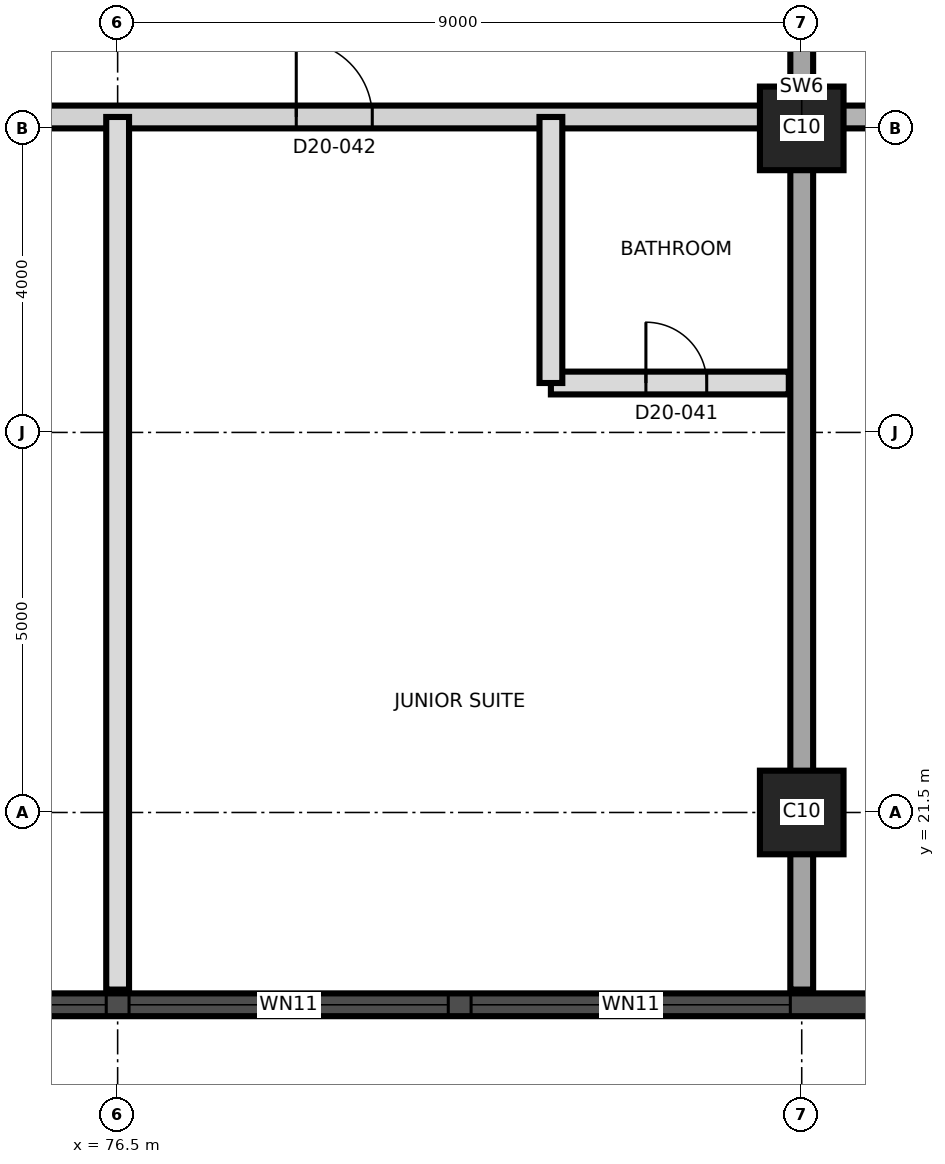
"""IFC4 building model, lengths in metres.
Left out: names, types, materials, properties, quantities, classifications, styles, units other than length and angle.
Written with IfcOpenShell. Run it as: python <this file> out.ifc"""

import sys

from ifc_helpers import new_model, si_unit, direction, frame, frame_2d, origin, origin_2d, place, context, subcontext, project, spatial, rectangle, extrude, element, fill, save


model = new_model("IFC4")
c1 = context("Model", 3, precision=1e-05, world=origin(), true_north=direction((0.0, 1.0)))
c2 = subcontext(c1, "Body", "Model", "MODEL_VIEW")
j1 = project(units=[si_unit("LENGTHUNIT", "METRE"), si_unit("PLANEANGLEUNIT", "RADIAN")], contexts=[c1])
p1 = place(None, origin())
s1 = spatial("IfcSite", under=j1, at=p1, CompositionType="ELEMENT")
p2 = place(p1, origin())
s2 = spatial("IfcBuilding", under=s1, at=p2, CompositionType="ELEMENT")
p3 = place(p2, frame((0.0, 0.0, 186.6)))
s3 = spatial("IfcBuildingStorey", under=s2, at=p3, CompositionType="ELEMENT", Elevation=186.6)
for number, where, z_axis, x_axis in (
    (1, (85.5, 21.5, 0.0), (0.0, 0.0, 1.0), (1.0, 0.0, 0.0)),
    (2, (85.5, 30.5, 0.0), (0.0, 0.0, 1.0), (1.0, 0.0, 0.0)),
):
    element("IfcColumn", number, at=place(p3, frame(where, z_axis=z_axis, x_axis=x_axis)), inside=s3, PredefinedType="COLUMN", context=c2, shape_type="SweptSolid", body=[
        extrude(rectangle(XDim=1.1, YDim=1.1, at=origin_2d()), origin(), (0.0, 0.0, 1.0), 3.7),
    ])
p4 = place(p3, frame((85.5, 19.17, 0.0), z_axis=(0.0, 0.0, 1.0), x_axis=(0.0, 1.0, 0.0)))
e3 = element("IfcWall", 3, at=p4, inside=s3, PredefinedType="SHEAR", context=c2, shape_type="SweptSolid", body=[
    extrude(rectangle(XDim=22.66, YDim=0.3, at=frame_2d((11.33, 0.0))), origin(), (0.0, 0.0, 1.0), 3.7),
])
p5 = place(p4, frame((12.53, 0.0, 0.0)))
e4 = element("IfcOpeningElement", 4, at=p5, cuts=e3, PredefinedType="OPENING", context=c2, shape_type="SweptSolid", body=[
    extrude(rectangle(XDim=1.4, YDim=2.1, at=frame_2d((0.7, 1.05))), frame((0.0, 0.16, 0.0), z_axis=(0.0, -1.0, 0.0), x_axis=(1.0, 0.0, 0.0)), (0.0, 0.0, 1.0), 0.32),
])
p6 = place(p3, frame((44.01, 18.97, 0.0), z_axis=(0.0, 0.0, 1.0), x_axis=(1.0, 0.0, 0.0)))
e5 = element("IfcWall", 5, at=p6, inside=s3, PredefinedType="SOLIDWALL", context=c2, shape_type="SweptSolid", body=[
    extrude(rectangle(XDim=43.478, YDim=0.3, at=frame_2d((21.739, 0.0))), origin(), (0.0, 0.0, 1.0), 3.4),
])
p7 = place(p6, frame((1.845, 0.0, 0.3)))
e6 = element("IfcOpeningElement", 6, at=p7, cuts=e5, PredefinedType="OPENING", context=c2, shape_type="SweptSolid", body=[
    extrude(rectangle(XDim=1.8, YDim=2.4, at=frame_2d((0.9, 1.2))), frame((0.0, 0.16, 0.0), z_axis=(0.0, -1.0, 0.0), x_axis=(1.0, 0.0, 0.0)), (0.0, 0.0, 1.0), 0.32),
])
p8 = place(p6, frame((5.64, 0.0, 0.9)))
e7 = element("IfcOpeningElement", 7, at=p8, cuts=e5, PredefinedType="OPENING", context=c2, shape_type="SweptSolid", body=[
    extrude(rectangle(XDim=4.2, YDim=1.5, at=frame_2d((2.1, 0.75))), frame((0.0, 0.16, 0.0), z_axis=(0.0, -1.0, 0.0), x_axis=(1.0, 0.0, 0.0)), (0.0, 0.0, 1.0), 0.32),
])
p9 = place(p6, frame((10.14, 0.0, 0.9)))
e8 = element("IfcOpeningElement", 8, at=p9, cuts=e5, PredefinedType="OPENING", context=c2, shape_type="SweptSolid", body=[
    extrude(rectangle(XDim=4.2, YDim=1.5, at=frame_2d((2.1, 0.75))), frame((0.0, 0.16, 0.0), z_axis=(0.0, -1.0, 0.0), x_axis=(1.0, 0.0, 0.0)), (0.0, 0.0, 1.0), 0.32),
])
p10 = place(p6, frame((14.64, 0.0, 0.9)))
e9 = element("IfcOpeningElement", 9, at=p10, cuts=e5, PredefinedType="OPENING", context=c2, shape_type="SweptSolid", body=[
    extrude(rectangle(XDim=4.2, YDim=1.5, at=frame_2d((2.1, 0.75))), frame((0.0, 0.16, 0.0), z_axis=(0.0, -1.0, 0.0), x_axis=(1.0, 0.0, 0.0)), (0.0, 0.0, 1.0), 0.32),
])
p11 = place(p6, frame((19.14, 0.0, 0.9)))
e10 = element("IfcOpeningElement", 10, at=p11, cuts=e5, PredefinedType="OPENING", context=c2, shape_type="SweptSolid", body=[
    extrude(rectangle(XDim=4.2, YDim=1.5, at=frame_2d((2.1, 0.75))), frame((0.0, 0.16, 0.0), z_axis=(0.0, -1.0, 0.0), x_axis=(1.0, 0.0, 0.0)), (0.0, 0.0, 1.0), 0.32),
])
p12 = place(p6, frame((23.64, 0.0, 0.9)))
e11 = element("IfcOpeningElement", 11, at=p12, cuts=e5, PredefinedType="OPENING", context=c2, shape_type="SweptSolid", body=[
    extrude(rectangle(XDim=4.2, YDim=1.5, at=frame_2d((2.1, 0.75))), frame((0.0, 0.16, 0.0), z_axis=(0.0, -1.0, 0.0), x_axis=(1.0, 0.0, 0.0)), (0.0, 0.0, 1.0), 0.32),
])
p13 = place(p6, frame((28.14, 0.0, 0.9)))
e12 = element("IfcOpeningElement", 12, at=p13, cuts=e5, PredefinedType="OPENING", context=c2, shape_type="SweptSolid", body=[
    extrude(rectangle(XDim=4.2, YDim=1.5, at=frame_2d((2.1, 0.75))), frame((0.0, 0.16, 0.0), z_axis=(0.0, -1.0, 0.0), x_axis=(1.0, 0.0, 0.0)), (0.0, 0.0, 1.0), 0.32),
])
p14 = place(p6, frame((32.64, 0.0, 0.9)))
e13 = element("IfcOpeningElement", 13, at=p14, cuts=e5, PredefinedType="OPENING", context=c2, shape_type="SweptSolid", body=[
    extrude(rectangle(XDim=4.2, YDim=1.5, at=frame_2d((2.1, 0.75))), frame((0.0, 0.16, 0.0), z_axis=(0.0, -1.0, 0.0), x_axis=(1.0, 0.0, 0.0)), (0.0, 0.0, 1.0), 0.32),
])
p15 = place(p6, frame((37.14, 0.0, 0.9)))
e14 = element("IfcOpeningElement", 14, at=p15, cuts=e5, PredefinedType="OPENING", context=c2, shape_type="SweptSolid", body=[
    extrude(rectangle(XDim=4.2, YDim=1.5, at=frame_2d((2.1, 0.75))), frame((0.0, 0.16, 0.0), z_axis=(0.0, -1.0, 0.0), x_axis=(1.0, 0.0, 0.0)), (0.0, 0.0, 1.0), 0.32),
])
p16 = place(p3, frame((82.2, 27.15, 0.0), z_axis=(0.0, 0.0, 1.0), x_axis=(1.0, 0.0, 0.0)))
e15 = element("IfcWall", 15, at=p16, inside=s3, PredefinedType="PARTITIONING", context=c2, shape_type="SweptSolid", body=[
    extrude(rectangle(XDim=3.13, YDim=0.3, at=frame_2d((1.565, 0.0))), origin(), (0.0, 0.0, 1.0), 3.4),
])
p17 = place(p16, frame((1.25, 0.0, 0.0)))
e16 = element("IfcOpeningElement", 16, at=p17, cuts=e15, PredefinedType="OPENING", context=c2, shape_type="SweptSolid", body=[
    extrude(rectangle(XDim=0.8, YDim=2.1, at=frame_2d((0.4, 1.05))), frame((0.0, 0.16, 0.0), z_axis=(0.0, -1.0, 0.0), x_axis=(1.0, 0.0, 0.0)), (0.0, 0.0, 1.0), 0.32),
])
p18 = place(p3, frame((58.65, 30.65, 0.0), z_axis=(0.0, 0.0, 1.0), x_axis=(1.0, 0.0, 0.0)))
e17 = element("IfcWall", 17, at=p18, inside=s3, PredefinedType="PARTITIONING", context=c2, shape_type="SweptSolid", body=[
    extrude(rectangle(XDim=26.68, YDim=0.3, at=frame_2d((13.34, 0.0))), origin(), (0.0, 0.0, 1.0), 3.4),
])
p19 = place(p18, frame((2.9, 0.0, 0.0)))
e18 = element("IfcOpeningElement", 18, at=p19, cuts=e17, PredefinedType="OPENING", context=c2, shape_type="SweptSolid", body=[
    extrude(rectangle(XDim=1.0, YDim=2.1, at=frame_2d((0.5, 1.05))), frame((0.0, 0.16, 0.0), z_axis=(0.0, -1.0, 0.0), x_axis=(1.0, 0.0, 0.0)), (0.0, 0.0, 1.0), 0.32),
])
p20 = place(p18, frame((5.85, 0.0, 0.0)))
e19 = element("IfcOpeningElement", 19, at=p20, cuts=e17, PredefinedType="OPENING", context=c2, shape_type="SweptSolid", body=[
    extrude(rectangle(XDim=1.4, YDim=2.1, at=frame_2d((0.7, 1.05))), frame((0.0, 0.16, 0.0), z_axis=(0.0, -1.0, 0.0), x_axis=(1.0, 0.0, 0.0)), (0.0, 0.0, 1.0), 0.32),
])
p21 = place(p18, frame((10.0, 0.0, 0.0)))
e20 = element("IfcOpeningElement", 20, at=p21, cuts=e17, PredefinedType="OPENING", context=c2, shape_type="SweptSolid", body=[
    extrude(rectangle(XDim=1.0, YDim=2.1, at=frame_2d((0.5, 1.05))), frame((0.0, 0.16, 0.0), z_axis=(0.0, -1.0, 0.0), x_axis=(1.0, 0.0, 0.0)), (0.0, 0.0, 1.0), 0.32),
])
p22 = place(p18, frame((15.85, 0.0, 0.0)))
e21 = element("IfcOpeningElement", 21, at=p22, cuts=e17, PredefinedType="OPENING", context=c2, shape_type="SweptSolid", body=[
    extrude(rectangle(XDim=1.0, YDim=2.1, at=frame_2d((0.5, 1.05))), frame((0.0, 0.16, 0.0), z_axis=(0.0, -1.0, 0.0), x_axis=(1.0, 0.0, 0.0)), (0.0, 0.0, 1.0), 0.32),
])
p23 = place(p18, frame((20.2, 0.0, 0.0)))
e22 = element("IfcOpeningElement", 22, at=p23, cuts=e17, PredefinedType="OPENING", context=c2, shape_type="SweptSolid", body=[
    extrude(rectangle(XDim=1.0, YDim=2.1, at=frame_2d((0.5, 1.05))), frame((0.0, 0.16, 0.0), z_axis=(0.0, -1.0, 0.0), x_axis=(1.0, 0.0, 0.0)), (0.0, 0.0, 1.0), 0.32),
])
p24 = place(p3, frame((85.67, 30.65, 0.0), z_axis=(0.0, 0.0, 1.0), x_axis=(1.0, 0.0, 0.0)))
e23 = element("IfcWall", 23, at=p24, inside=s3, PredefinedType="SHEAR", context=c2, shape_type="SweptSolid", body=[
    extrude(rectangle(XDim=9.58, YDim=0.3, at=frame_2d((4.79, 0.0))), origin(), (0.0, 0.0, 1.0), 3.4),
])
p25 = place(p24, frame((2.08, 0.0, 0.0)))
e24 = element("IfcOpeningElement", 24, at=p25, cuts=e23, PredefinedType="OPENING", context=c2, shape_type="SweptSolid", body=[
    extrude(rectangle(XDim=1.2, YDim=2.1, at=frame_2d((0.6, 1.05))), frame((0.0, 0.16, 0.0), z_axis=(0.0, -1.0, 0.0), x_axis=(1.0, 0.0, 0.0)), (0.0, 0.0, 1.0), 0.32),
])
p26 = place(p24, frame((5.63, 0.0, 0.0)))
e25 = element("IfcOpeningElement", 25, at=p26, cuts=e23, PredefinedType="OPENING", context=c2, shape_type="SweptSolid", body=[
    extrude(rectangle(XDim=1.0, YDim=2.1, at=frame_2d((0.5, 1.05))), frame((0.0, 0.16, 0.0), z_axis=(0.0, -1.0, 0.0), x_axis=(1.0, 0.0, 0.0)), (0.0, 0.0, 1.0), 0.32),
])
p27 = place(p3, frame((76.5, 19.17, 0.0), z_axis=(0.0, 0.0, 1.0), x_axis=(0.0, 1.0, 0.0)))
e26 = element("IfcWall", 26, at=p27, inside=s3, PredefinedType="PARTITIONING", context=c2, shape_type="SweptSolid", body=[
    extrude(rectangle(XDim=11.48, YDim=0.3, at=frame_2d((5.74, 0.0))), origin(), (0.0, 0.0, 1.0), 3.35),
])
p28 = place(p3, frame((82.2, 27.15, 0.0), z_axis=(0.0, 0.0, 1.0), x_axis=(0.0, 1.0, 0.0)))
e27 = element("IfcWall", 27, at=p28, inside=s3, PredefinedType="PARTITIONING", context=c2, shape_type="SweptSolid", body=[
    extrude(rectangle(XDim=3.5, YDim=0.3, at=frame_2d((1.75, 0.0))), origin(), (0.0, 0.0, 1.0), 3.4),
])
p29 = place(p13, origin())
e28 = element("IfcWindow", 28, at=p29, inside=s3, PartitioningType="SINGLE_PANEL", PredefinedType="WINDOW", context=c2, shape_type="SweptSolid", body=[
    extrude(rectangle(XDim=4.2, YDim=1.5, at=frame_2d((2.1, 0.75))), frame((0.0, 0.03, 0.0), z_axis=(0.0, -1.0, 0.0), x_axis=(1.0, 0.0, 0.0)), (0.0, 0.0, 1.0), 0.06),
])
fill(e12, e28)
p30 = place(p14, origin())
e29 = element("IfcWindow", 29, at=p30, inside=s3, PartitioningType="SINGLE_PANEL", PredefinedType="WINDOW", context=c2, shape_type="SweptSolid", body=[
    extrude(rectangle(XDim=4.2, YDim=1.5, at=frame_2d((2.1, 0.75))), frame((0.0, 0.03, 0.0), z_axis=(0.0, -1.0, 0.0), x_axis=(1.0, 0.0, 0.0)), (0.0, 0.0, 1.0), 0.06),
])
fill(e13, e29)
p31 = place(p15, origin())
e30 = element("IfcWindow", 30, at=p31, inside=s3, PartitioningType="SINGLE_PANEL", PredefinedType="WINDOW", context=c2, shape_type="SweptSolid", body=[
    extrude(rectangle(XDim=4.2, YDim=1.5, at=frame_2d((2.1, 0.75))), frame((0.0, 0.03, 0.0), z_axis=(0.0, -1.0, 0.0), x_axis=(1.0, 0.0, 0.0)), (0.0, 0.0, 1.0), 0.06),
])
fill(e14, e30)
p32 = place(p17, origin())
e31 = element("IfcDoor", 31, at=p32, inside=s3, OperationType="SINGLE_SWING_LEFT", PredefinedType="DOOR", context=c2, shape_type="SweptSolid", body=[
    extrude(rectangle(XDim=0.8, YDim=2.1, at=frame_2d((0.4, 1.05))), frame((0.0, 0.025, 0.0), z_axis=(0.0, -1.0, 0.0), x_axis=(1.0, 0.0, 0.0)), (0.0, 0.0, 1.0), 0.05),
])
fill(e16, e31)
p33 = place(p23, origin())
e32 = element("IfcDoor", 32, at=p33, inside=s3, OperationType="SINGLE_SWING_RIGHT", PredefinedType="DOOR", context=c2, shape_type="SweptSolid", body=[
    extrude(rectangle(XDim=1.0, YDim=2.1, at=frame_2d((0.5, 1.05))), frame((0.0, 0.025, 0.0), z_axis=(0.0, -1.0, 0.0), x_axis=(1.0, 0.0, 0.0)), (0.0, 0.0, 1.0), 0.05),
])
fill(e22, e32)
save(model, sys.argv[1])
